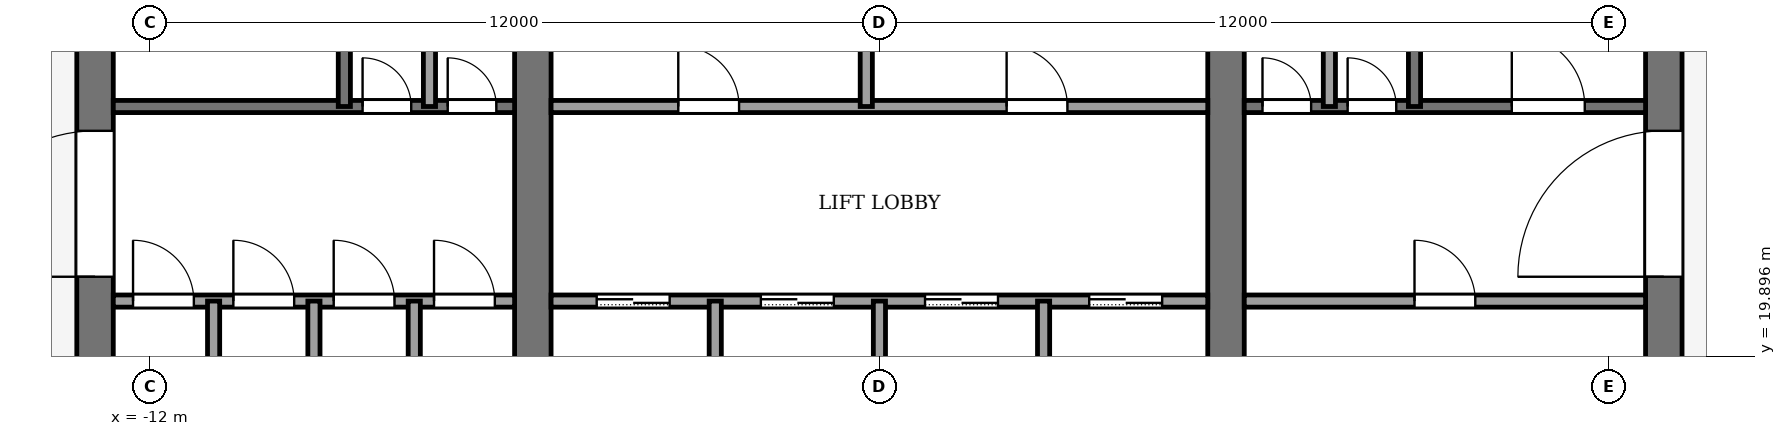
"""IFC4 building model, lengths in metres.
Left out: names, types, materials, properties, quantities, classifications, styles, units other than length and angle.
Written with IfcOpenShell. Run it as: python <this file> out.ifc"""

import sys

from ifc_helpers import new_model, si_unit, direction, frame, frame_2d, origin, place, context, subcontext, project, spatial, rectangle, extrude, element, fill, save


model = new_model("IFC4")
c1 = context("Model", 3, precision=1e-05, world=origin(), true_north=direction((0.0, 1.0)))
c2 = subcontext(c1, "Body", "Model", "MODEL_VIEW")
j1 = project(units=[si_unit("LENGTHUNIT", "METRE"), si_unit("PLANEANGLEUNIT", "RADIAN")], contexts=[c1])
p1 = place(None, origin())
s1 = spatial("IfcSite", under=j1, at=p1, CompositionType="ELEMENT")
p2 = place(p1, origin())
s2 = spatial("IfcBuilding", under=s1, at=p2, CompositionType="ELEMENT")
p3 = place(p2, frame((0.0, 0.0, 302.0)))
s3 = spatial("IfcBuildingStorey", under=s2, at=p3, CompositionType="ELEMENT", Elevation=302.0)
p4 = place(p3, frame((-12.9, 18.4, -0.13), z_axis=(0.0, 0.0, 1.0), x_axis=(0.0, 1.0, 0.0)))
e1 = element("IfcWall", 1, at=p4, inside=s3, PredefinedType="SHEAR", context=c2, shape_type="SweptSolid", body=[
    extrude(rectangle(XDim=19.2, YDim=0.6, at=frame_2d((9.6, 0.0))), origin(), (0.0, 0.0, 1.0), 4.0),
])
p5 = place(p4, frame((2.8, 0.0, 0.13)))
e2 = element("IfcOpeningElement", 2, at=p5, cuts=e1, PredefinedType="OPENING", context=c2, shape_type="SweptSolid", body=[
    extrude(rectangle(XDim=2.4, YDim=2.4, at=frame_2d((1.2, 1.2))), frame((0.0, 0.31, 0.0), z_axis=(0.0, -1.0, 0.0), x_axis=(1.0, 0.0, 0.0)), (0.0, 0.0, 1.0), 0.62),
])
p6 = place(p4, frame((13.4, 0.0, 0.13)))
e3 = element("IfcOpeningElement", 3, at=p6, cuts=e1, PredefinedType="OPENING", context=c2, shape_type="SweptSolid", body=[
    extrude(rectangle(XDim=1.4, YDim=2.2, at=frame_2d((0.7, 1.1))), frame((0.0, 0.31, 0.0), z_axis=(0.0, -1.0, 0.0), x_axis=(1.0, 0.0, 0.0)), (0.0, 0.0, 1.0), 0.62),
])
p7 = place(p3, frame((12.9, 18.4, -0.13), z_axis=(0.0, 0.0, 1.0), x_axis=(0.0, 1.0, 0.0)))
e4 = element("IfcWall", 4, at=p7, inside=s3, PredefinedType="SHEAR", context=c2, shape_type="SweptSolid", body=[
    extrude(rectangle(XDim=19.2, YDim=0.6, at=frame_2d((9.6, 0.0))), origin(), (0.0, 0.0, 1.0), 4.0),
])
p8 = place(p7, frame((2.8, 0.0, 0.13)))
e5 = element("IfcOpeningElement", 5, at=p8, cuts=e4, PredefinedType="OPENING", context=c2, shape_type="SweptSolid", body=[
    extrude(rectangle(XDim=2.4, YDim=2.4, at=frame_2d((1.2, 1.2))), frame((0.0, 0.31, 0.0), z_axis=(0.0, -1.0, 0.0), x_axis=(1.0, 0.0, 0.0)), (0.0, 0.0, 1.0), 0.62),
])
p9 = place(p7, frame((13.3, 0.0, 0.13)))
e6 = element("IfcOpeningElement", 6, at=p9, cuts=e4, PredefinedType="OPENING", context=c2, shape_type="SweptSolid", body=[
    extrude(rectangle(XDim=2.4, YDim=2.4, at=frame_2d((1.2, 1.2))), frame((0.0, 0.31, 0.0), z_axis=(0.0, -1.0, 0.0), x_axis=(1.0, 0.0, 0.0)), (0.0, 0.0, 1.0), 0.62),
])
p10 = place(p3, frame((-5.7, 18.4, -0.13), z_axis=(0.0, 0.0, 1.0), x_axis=(0.0, 1.0, 0.0)))
e7 = element("IfcWall", 7, at=p10, inside=s3, PredefinedType="SHEAR", context=c2, shape_type="SweptSolid", body=[
    extrude(rectangle(XDim=19.2, YDim=0.6, at=frame_2d((9.6, 0.0))), origin(), (0.0, 0.0, 1.0), 4.0),
])
p11 = place(p10, frame((8.35, 0.0, 0.13)))
e8 = element("IfcOpeningElement", 8, at=p11, cuts=e7, PredefinedType="OPENING", context=c2, shape_type="SweptSolid", body=[
    extrude(rectangle(XDim=0.9, YDim=2.1, at=frame_2d((0.45, 1.05))), frame((0.0, 0.31, 0.0), z_axis=(0.0, -1.0, 0.0), x_axis=(1.0, 0.0, 0.0)), (0.0, 0.0, 1.0), 0.62),
])
p12 = place(p3, frame((5.7, 18.4, -0.13), z_axis=(0.0, 0.0, 1.0), x_axis=(0.0, 1.0, 0.0)))
e9 = element("IfcWall", 9, at=p12, inside=s3, PredefinedType="SHEAR", context=c2, shape_type="SweptSolid", body=[
    extrude(rectangle(XDim=19.2, YDim=0.6, at=frame_2d((9.6, 0.0))), origin(), (0.0, 0.0, 1.0), 4.0),
])
p13 = place(p12, frame((8.35, 0.0, 0.13)))
e10 = element("IfcOpeningElement", 10, at=p13, cuts=e9, PredefinedType="OPENING", context=c2, shape_type="SweptSolid", body=[
    extrude(rectangle(XDim=0.9, YDim=2.1, at=frame_2d((0.45, 1.05))), frame((0.0, 0.31, 0.0), z_axis=(0.0, -1.0, 0.0), x_axis=(1.0, 0.0, 0.0)), (0.0, 0.0, 1.0), 0.62),
])
p14 = place(p12, frame((13.3, 0.0, 0.13)))
e11 = element("IfcOpeningElement", 11, at=p14, cuts=e9, PredefinedType="OPENING", context=c2, shape_type="SweptSolid", body=[
    extrude(rectangle(XDim=2.4, YDim=2.4, at=frame_2d((1.2, 1.2))), frame((0.0, 0.31, 0.0), z_axis=(0.0, -1.0, 0.0), x_axis=(1.0, 0.0, 0.0)), (0.0, 0.0, 1.0), 0.62),
])
p15 = place(p3, frame((-12.6, 20.8, 0.0), z_axis=(0.0, 0.0, 1.0), x_axis=(1.0, 0.0, 0.0)))
e12 = element("IfcWall", 12, at=p15, inside=s3, PredefinedType="PARTITIONING", context=c2, shape_type="SweptSolid", body=[
    extrude(rectangle(XDim=6.6, YDim=0.2, at=frame_2d((3.3, 0.0))), origin(), (0.0, 0.0, 1.0), 3.87),
])
p16 = place(p15, frame((0.325, 0.0, 0.0)))
e13 = element("IfcOpeningElement", 13, at=p16, cuts=e12, PredefinedType="OPENING", context=c2, shape_type="SweptSolid", body=[
    extrude(rectangle(XDim=1.0, YDim=2.1, at=frame_2d((0.5, 1.05))), frame((0.0, 0.11, 0.0), z_axis=(0.0, -1.0, 0.0), x_axis=(1.0, 0.0, 0.0)), (0.0, 0.0, 1.0), 0.22),
])
p17 = place(p15, frame((1.975, 0.0, 0.0)))
e14 = element("IfcOpeningElement", 14, at=p17, cuts=e12, PredefinedType="OPENING", context=c2, shape_type="SweptSolid", body=[
    extrude(rectangle(XDim=1.0, YDim=2.1, at=frame_2d((0.5, 1.05))), frame((0.0, 0.11, 0.0), z_axis=(0.0, -1.0, 0.0), x_axis=(1.0, 0.0, 0.0)), (0.0, 0.0, 1.0), 0.22),
])
p18 = place(p15, frame((3.625, 0.0, 0.0)))
e15 = element("IfcOpeningElement", 15, at=p18, cuts=e12, PredefinedType="OPENING", context=c2, shape_type="SweptSolid", body=[
    extrude(rectangle(XDim=1.0, YDim=2.1, at=frame_2d((0.5, 1.05))), frame((0.0, 0.11, 0.0), z_axis=(0.0, -1.0, 0.0), x_axis=(1.0, 0.0, 0.0)), (0.0, 0.0, 1.0), 0.22),
])
p19 = place(p15, frame((5.275, 0.0, 0.0)))
e16 = element("IfcOpeningElement", 16, at=p19, cuts=e12, PredefinedType="OPENING", context=c2, shape_type="SweptSolid", body=[
    extrude(rectangle(XDim=1.0, YDim=2.1, at=frame_2d((0.5, 1.05))), frame((0.0, 0.11, 0.0), z_axis=(0.0, -1.0, 0.0), x_axis=(1.0, 0.0, 0.0)), (0.0, 0.0, 1.0), 0.22),
])
p20 = place(p3, frame((-5.4, 20.8, 0.0), z_axis=(0.0, 0.0, 1.0), x_axis=(1.0, 0.0, 0.0)))
e17 = element("IfcWall", 17, at=p20, inside=s3, PredefinedType="PARTITIONING", context=c2, shape_type="SweptSolid", body=[
    extrude(rectangle(XDim=10.8, YDim=0.2, at=frame_2d((5.4, 0.0))), origin(), (0.0, 0.0, 1.0), 3.87),
])
p21 = place(p20, frame((0.75, 0.0, 0.0)))
e18 = element("IfcOpeningElement", 18, at=p21, cuts=e17, PredefinedType="OPENING", context=c2, shape_type="SweptSolid", body=[
    extrude(rectangle(XDim=1.2, YDim=2.2, at=frame_2d((0.6, 1.1))), frame((0.0, 0.11, 0.0), z_axis=(0.0, -1.0, 0.0), x_axis=(1.0, 0.0, 0.0)), (0.0, 0.0, 1.0), 0.22),
])
p22 = place(p20, frame((3.45, 0.0, 0.0)))
e19 = element("IfcOpeningElement", 19, at=p22, cuts=e17, PredefinedType="OPENING", context=c2, shape_type="SweptSolid", body=[
    extrude(rectangle(XDim=1.2, YDim=2.2, at=frame_2d((0.6, 1.1))), frame((0.0, 0.11, 0.0), z_axis=(0.0, -1.0, 0.0), x_axis=(1.0, 0.0, 0.0)), (0.0, 0.0, 1.0), 0.22),
])
p23 = place(p20, frame((6.15, 0.0, 0.0)))
e20 = element("IfcOpeningElement", 20, at=p23, cuts=e17, PredefinedType="OPENING", context=c2, shape_type="SweptSolid", body=[
    extrude(rectangle(XDim=1.2, YDim=2.2, at=frame_2d((0.6, 1.1))), frame((0.0, 0.11, 0.0), z_axis=(0.0, -1.0, 0.0), x_axis=(1.0, 0.0, 0.0)), (0.0, 0.0, 1.0), 0.22),
])
p24 = place(p20, frame((8.85, 0.0, 0.0)))
e21 = element("IfcOpeningElement", 21, at=p24, cuts=e17, PredefinedType="OPENING", context=c2, shape_type="SweptSolid", body=[
    extrude(rectangle(XDim=1.2, YDim=2.2, at=frame_2d((0.6, 1.1))), frame((0.0, 0.11, 0.0), z_axis=(0.0, -1.0, 0.0), x_axis=(1.0, 0.0, 0.0)), (0.0, 0.0, 1.0), 0.22),
])
p25 = place(p3, frame((6.0, 20.8, 0.0), z_axis=(0.0, 0.0, 1.0), x_axis=(1.0, 0.0, 0.0)))
e22 = element("IfcWall", 22, at=p25, inside=s3, PredefinedType="PARTITIONING", context=c2, shape_type="SweptSolid", body=[
    extrude(rectangle(XDim=6.6, YDim=0.2, at=frame_2d((3.3, 0.0))), origin(), (0.0, 0.0, 1.0), 3.87),
])
p26 = place(p25, frame((2.8, 0.0, 0.0)))
e23 = element("IfcOpeningElement", 23, at=p26, cuts=e22, PredefinedType="OPENING", context=c2, shape_type="SweptSolid", body=[
    extrude(rectangle(XDim=1.0, YDim=2.1, at=frame_2d((0.5, 1.05))), frame((0.0, 0.11, 0.0), z_axis=(0.0, -1.0, 0.0), x_axis=(1.0, 0.0, 0.0)), (0.0, 0.0, 1.0), 0.22),
])
p27 = place(p3, frame((-12.6, 24.0, 0.0), z_axis=(0.0, 0.0, 1.0), x_axis=(1.0, 0.0, 0.0)))
e24 = element("IfcWall", 24, at=p27, inside=s3, PredefinedType="PARTITIONING", context=c2, shape_type="SweptSolid", body=[
    extrude(rectangle(XDim=6.6, YDim=0.2, at=frame_2d((3.3, 0.0))), origin(), (0.0, 0.0, 1.0), 3.87),
])
p28 = place(p27, frame((4.1, 0.0, 0.0)))
e25 = element("IfcOpeningElement", 25, at=p28, cuts=e24, PredefinedType="OPENING", context=c2, shape_type="SweptSolid", body=[
    extrude(rectangle(XDim=0.8, YDim=2.1, at=frame_2d((0.4, 1.05))), frame((0.0, 0.11, 0.0), z_axis=(0.0, -1.0, 0.0), x_axis=(1.0, 0.0, 0.0)), (0.0, 0.0, 1.0), 0.22),
])
p29 = place(p27, frame((5.5, 0.0, 0.0)))
e26 = element("IfcOpeningElement", 26, at=p29, cuts=e24, PredefinedType="OPENING", context=c2, shape_type="SweptSolid", body=[
    extrude(rectangle(XDim=0.8, YDim=2.1, at=frame_2d((0.4, 1.05))), frame((0.0, 0.11, 0.0), z_axis=(0.0, -1.0, 0.0), x_axis=(1.0, 0.0, 0.0)), (0.0, 0.0, 1.0), 0.22),
])
p30 = place(p3, frame((-5.4, 24.0, 0.0), z_axis=(0.0, 0.0, 1.0), x_axis=(1.0, 0.0, 0.0)))
e27 = element("IfcWall", 27, at=p30, inside=s3, PredefinedType="PARTITIONING", context=c2, shape_type="SweptSolid", body=[
    extrude(rectangle(XDim=10.8, YDim=0.2, at=frame_2d((5.4, 0.0))), origin(), (0.0, 0.0, 1.0), 3.87),
])
p31 = place(p30, frame((2.092, 0.0, 0.0)))
e28 = element("IfcOpeningElement", 28, at=p31, cuts=e27, PredefinedType="OPENING", context=c2, shape_type="SweptSolid", body=[
    extrude(rectangle(XDim=1.0, YDim=2.1, at=frame_2d((0.5, 1.05))), frame((0.0, 0.11, 0.0), z_axis=(0.0, -1.0, 0.0), x_axis=(1.0, 0.0, 0.0)), (0.0, 0.0, 1.0), 0.22),
])
p32 = place(p30, frame((7.492, 0.0, 0.0)))
e29 = element("IfcOpeningElement", 29, at=p32, cuts=e27, PredefinedType="OPENING", context=c2, shape_type="SweptSolid", body=[
    extrude(rectangle(XDim=1.0, YDim=2.1, at=frame_2d((0.5, 1.05))), frame((0.0, 0.11, 0.0), z_axis=(0.0, -1.0, 0.0), x_axis=(1.0, 0.0, 0.0)), (0.0, 0.0, 1.0), 0.22),
])
p33 = place(p3, frame((6.0, 24.0, 0.0), z_axis=(0.0, 0.0, 1.0), x_axis=(1.0, 0.0, 0.0)))
e30 = element("IfcWall", 30, at=p33, inside=s3, PredefinedType="PARTITIONING", context=c2, shape_type="SweptSolid", body=[
    extrude(rectangle(XDim=6.6, YDim=0.2, at=frame_2d((3.3, 0.0))), origin(), (0.0, 0.0, 1.0), 3.87),
])
p34 = place(p33, frame((0.3, 0.0, 0.0)))
e31 = element("IfcOpeningElement", 31, at=p34, cuts=e30, PredefinedType="OPENING", context=c2, shape_type="SweptSolid", body=[
    extrude(rectangle(XDim=0.8, YDim=2.1, at=frame_2d((0.4, 1.05))), frame((0.0, 0.11, 0.0), z_axis=(0.0, -1.0, 0.0), x_axis=(1.0, 0.0, 0.0)), (0.0, 0.0, 1.0), 0.22),
])
p35 = place(p33, frame((1.7, 0.0, 0.0)))
e32 = element("IfcOpeningElement", 32, at=p35, cuts=e30, PredefinedType="OPENING", context=c2, shape_type="SweptSolid", body=[
    extrude(rectangle(XDim=0.8, YDim=2.1, at=frame_2d((0.4, 1.05))), frame((0.0, 0.11, 0.0), z_axis=(0.0, -1.0, 0.0), x_axis=(1.0, 0.0, 0.0)), (0.0, 0.0, 1.0), 0.22),
])
p36 = place(p33, frame((4.4, 0.0, 0.0)))
e33 = element("IfcOpeningElement", 33, at=p36, cuts=e30, PredefinedType="OPENING", context=c2, shape_type="SweptSolid", body=[
    extrude(rectangle(XDim=1.2, YDim=2.2, at=frame_2d((0.6, 1.1))), frame((0.0, 0.11, 0.0), z_axis=(0.0, -1.0, 0.0), x_axis=(1.0, 0.0, 0.0)), (0.0, 0.0, 1.0), 0.22),
])
for number, where, z_axis, x_axis in (
    (34, (-10.95, 18.4, 0.0), (0.0, 0.0, 1.0), (0.0, 1.0, 0.0)),
    (35, (-9.3, 18.4, 0.0), (0.0, 0.0, 1.0), (0.0, 1.0, 0.0)),
):
    element("IfcWall", number, at=place(p3, frame(where, z_axis=z_axis, x_axis=x_axis)), inside=s3, PredefinedType="PARTITIONING", context=c2, shape_type="SweptSolid", body=[
        extrude(rectangle(XDim=2.4, YDim=0.2, at=frame_2d((1.2, 0.0))), origin(), (0.0, 0.0, 1.0), 3.87),
    ])
p37 = place(p3, frame((-8.8, 24.0, 0.0), z_axis=(0.0, 0.0, 1.0), x_axis=(0.0, 1.0, 0.0)))
e36 = element("IfcWall", 36, at=p37, inside=s3, PredefinedType="PARTITIONING", context=c2, shape_type="SweptSolid", body=[
    extrude(rectangle(XDim=7.4, YDim=0.2, at=frame_2d((3.7, 0.0))), origin(), (0.0, 0.0, 1.0), 3.87),
])
p38 = place(p3, frame((-7.65, 18.4, 0.0), z_axis=(0.0, 0.0, 1.0), x_axis=(0.0, 1.0, 0.0)))
e37 = element("IfcWall", 37, at=p38, inside=s3, PredefinedType="PARTITIONING", context=c2, shape_type="SweptSolid", body=[
    extrude(rectangle(XDim=2.4, YDim=0.2, at=frame_2d((1.2, 0.0))), origin(), (0.0, 0.0, 1.0), 3.87),
])
p39 = place(p3, frame((-7.4, 24.0, 0.0), z_axis=(0.0, 0.0, 1.0), x_axis=(0.0, 1.0, 0.0)))
e38 = element("IfcWall", 38, at=p39, inside=s3, PredefinedType="PARTITIONING", context=c2, shape_type="SweptSolid", body=[
    extrude(rectangle(XDim=7.4, YDim=0.2, at=frame_2d((3.7, 0.0))), origin(), (0.0, 0.0, 1.0), 3.87),
])
p40 = place(p3, frame((-2.7, 18.4, 0.0), z_axis=(0.0, 0.0, 1.0), x_axis=(0.0, 1.0, 0.0)))
e39 = element("IfcWall", 39, at=p40, inside=s3, PredefinedType="PARTITIONING", context=c2, shape_type="SweptSolid", body=[
    extrude(rectangle(XDim=2.4, YDim=0.2, at=frame_2d((1.2, 0.0))), origin(), (0.0, 0.0, 1.0), 3.87),
])
p41 = place(p3, frame((-0.216, 24.0, 0.0), z_axis=(0.0, 0.0, 1.0), x_axis=(0.0, 1.0, 0.0)))
e40 = element("IfcWall", 40, at=p41, inside=s3, PredefinedType="PARTITIONING", context=c2, shape_type="SweptSolid", body=[
    extrude(rectangle(XDim=2.4, YDim=0.2, at=frame_2d((1.2, 0.0))), origin(), (0.0, 0.0, 1.0), 3.87),
])
for number, where, z_axis, x_axis in (
    (41, (0.0, 18.4, 0.0), (0.0, 0.0, 1.0), (0.0, 1.0, 0.0)),
    (42, (2.7, 18.4, 0.0), (0.0, 0.0, 1.0), (0.0, 1.0, 0.0)),
):
    element("IfcWall", number, at=place(p3, frame(where, z_axis=z_axis, x_axis=x_axis)), inside=s3, PredefinedType="PARTITIONING", context=c2, shape_type="SweptSolid", body=[
        extrude(rectangle(XDim=2.4, YDim=0.2, at=frame_2d((1.2, 0.0))), origin(), (0.0, 0.0, 1.0), 3.87),
    ])
for number, where, z_axis, x_axis in (
    (43, (7.4, 24.0, 0.0), (0.0, 0.0, 1.0), (0.0, 1.0, 0.0)),
    (44, (8.8, 24.0, 0.0), (0.0, 0.0, 1.0), (0.0, 1.0, 0.0)),
):
    element("IfcWall", number, at=place(p3, frame(where, z_axis=z_axis, x_axis=x_axis)), inside=s3, PredefinedType="PARTITIONING", context=c2, shape_type="SweptSolid", body=[
        extrude(rectangle(XDim=7.4, YDim=0.2, at=frame_2d((3.7, 0.0))), origin(), (0.0, 0.0, 1.0), 3.87),
    ])
p42 = place(p21, origin())
e45 = element("IfcDoor", 45, at=p42, inside=s3, OperationType="SLIDING_TO_LEFT", PredefinedType="DOOR", context=c2, shape_type="SweptSolid", body=[
    extrude(rectangle(XDim=1.2, YDim=2.2, at=frame_2d((0.6, 1.1))), frame((0.0, 0.025, 0.0), z_axis=(0.0, -1.0, 0.0), x_axis=(1.0, 0.0, 0.0)), (0.0, 0.0, 1.0), 0.05),
])
fill(e18, e45)
p43 = place(p22, origin())
e46 = element("IfcDoor", 46, at=p43, inside=s3, OperationType="SLIDING_TO_LEFT", PredefinedType="DOOR", context=c2, shape_type="SweptSolid", body=[
    extrude(rectangle(XDim=1.2, YDim=2.2, at=frame_2d((0.6, 1.1))), frame((0.0, 0.025, 0.0), z_axis=(0.0, -1.0, 0.0), x_axis=(1.0, 0.0, 0.0)), (0.0, 0.0, 1.0), 0.05),
])
fill(e19, e46)
p44 = place(p23, origin())
e47 = element("IfcDoor", 47, at=p44, inside=s3, OperationType="SLIDING_TO_LEFT", PredefinedType="DOOR", context=c2, shape_type="SweptSolid", body=[
    extrude(rectangle(XDim=1.2, YDim=2.2, at=frame_2d((0.6, 1.1))), frame((0.0, 0.025, 0.0), z_axis=(0.0, -1.0, 0.0), x_axis=(1.0, 0.0, 0.0)), (0.0, 0.0, 1.0), 0.05),
])
fill(e20, e47)
p45 = place(p24, origin())
e48 = element("IfcDoor", 48, at=p45, inside=s3, OperationType="SLIDING_TO_LEFT", PredefinedType="DOOR", context=c2, shape_type="SweptSolid", body=[
    extrude(rectangle(XDim=1.2, YDim=2.2, at=frame_2d((0.6, 1.1))), frame((0.0, 0.025, 0.0), z_axis=(0.0, -1.0, 0.0), x_axis=(1.0, 0.0, 0.0)), (0.0, 0.0, 1.0), 0.05),
])
fill(e21, e48)
p46 = place(p31, origin())
e49 = element("IfcDoor", 49, at=p46, inside=s3, OperationType="SINGLE_SWING_RIGHT", PredefinedType="DOOR", context=c2, shape_type="SweptSolid", body=[
    extrude(rectangle(XDim=1.0, YDim=2.1, at=frame_2d((0.5, 1.05))), frame((0.0, 0.025, 0.0), z_axis=(0.0, -1.0, 0.0), x_axis=(1.0, 0.0, 0.0)), (0.0, 0.0, 1.0), 0.05),
])
fill(e28, e49)
p47 = place(p32, origin())
e50 = element("IfcDoor", 50, at=p47, inside=s3, OperationType="SINGLE_SWING_LEFT", PredefinedType="DOOR", context=c2, shape_type="SweptSolid", body=[
    extrude(rectangle(XDim=1.0, YDim=2.1, at=frame_2d((0.5, 1.05))), frame((0.0, 0.025, 0.0), z_axis=(0.0, -1.0, 0.0), x_axis=(1.0, 0.0, 0.0)), (0.0, 0.0, 1.0), 0.05),
])
fill(e29, e50)
p48 = place(p16, origin())
e51 = element("IfcDoor", 51, at=p48, inside=s3, OperationType="SINGLE_SWING_RIGHT", PredefinedType="DOOR", context=c2, shape_type="SweptSolid", body=[
    extrude(rectangle(XDim=1.0, YDim=2.1, at=frame_2d((0.5, 1.05))), frame((0.0, 0.025, 0.0), z_axis=(0.0, -1.0, 0.0), x_axis=(1.0, 0.0, 0.0)), (0.0, 0.0, 1.0), 0.05),
])
fill(e13, e51)
p49 = place(p17, origin())
e52 = element("IfcDoor", 52, at=p49, inside=s3, OperationType="SINGLE_SWING_RIGHT", PredefinedType="DOOR", context=c2, shape_type="SweptSolid", body=[
    extrude(rectangle(XDim=1.0, YDim=2.1, at=frame_2d((0.5, 1.05))), frame((0.0, 0.025, 0.0), z_axis=(0.0, -1.0, 0.0), x_axis=(1.0, 0.0, 0.0)), (0.0, 0.0, 1.0), 0.05),
])
fill(e14, e52)
p50 = place(p18, origin())
e53 = element("IfcDoor", 53, at=p50, inside=s3, OperationType="SINGLE_SWING_LEFT", PredefinedType="DOOR", context=c2, shape_type="SweptSolid", body=[
    extrude(rectangle(XDim=1.0, YDim=2.1, at=frame_2d((0.5, 1.05))), frame((0.0, 0.025, 0.0), z_axis=(0.0, -1.0, 0.0), x_axis=(1.0, 0.0, 0.0)), (0.0, 0.0, 1.0), 0.05),
])
fill(e15, e53)
p51 = place(p19, origin())
e54 = element("IfcDoor", 54, at=p51, inside=s3, OperationType="SINGLE_SWING_LEFT", PredefinedType="DOOR", context=c2, shape_type="SweptSolid", body=[
    extrude(rectangle(XDim=1.0, YDim=2.1, at=frame_2d((0.5, 1.05))), frame((0.0, 0.025, 0.0), z_axis=(0.0, -1.0, 0.0), x_axis=(1.0, 0.0, 0.0)), (0.0, 0.0, 1.0), 0.05),
])
fill(e16, e54)
p52 = place(p26, origin())
e55 = element("IfcDoor", 55, at=p52, inside=s3, OperationType="SINGLE_SWING_LEFT", PredefinedType="DOOR", context=c2, shape_type="SweptSolid", body=[
    extrude(rectangle(XDim=1.0, YDim=2.1, at=frame_2d((0.5, 1.05))), frame((0.0, 0.025, 0.0), z_axis=(0.0, -1.0, 0.0), x_axis=(1.0, 0.0, 0.0)), (0.0, 0.0, 1.0), 0.05),
])
fill(e23, e55)
p53 = place(p28, origin())
e56 = element("IfcDoor", 56, at=p53, inside=s3, OperationType="SINGLE_SWING_RIGHT", PredefinedType="DOOR", context=c2, shape_type="SweptSolid", body=[
    extrude(rectangle(XDim=0.8, YDim=2.1, at=frame_2d((0.4, 1.05))), frame((0.0, 0.025, 0.0), z_axis=(0.0, -1.0, 0.0), x_axis=(1.0, 0.0, 0.0)), (0.0, 0.0, 1.0), 0.05),
])
fill(e25, e56)
p54 = place(p29, origin())
e57 = element("IfcDoor", 57, at=p54, inside=s3, OperationType="SINGLE_SWING_LEFT", PredefinedType="DOOR", context=c2, shape_type="SweptSolid", body=[
    extrude(rectangle(XDim=0.8, YDim=2.1, at=frame_2d((0.4, 1.05))), frame((0.0, 0.025, 0.0), z_axis=(0.0, -1.0, 0.0), x_axis=(1.0, 0.0, 0.0)), (0.0, 0.0, 1.0), 0.05),
])
fill(e26, e57)
p55 = place(p34, origin())
e58 = element("IfcDoor", 58, at=p55, inside=s3, OperationType="SINGLE_SWING_RIGHT", PredefinedType="DOOR", context=c2, shape_type="SweptSolid", body=[
    extrude(rectangle(XDim=0.8, YDim=2.1, at=frame_2d((0.4, 1.05))), frame((0.0, 0.025, 0.0), z_axis=(0.0, -1.0, 0.0), x_axis=(1.0, 0.0, 0.0)), (0.0, 0.0, 1.0), 0.05),
])
fill(e31, e58)
p56 = place(p35, origin())
e59 = element("IfcDoor", 59, at=p56, inside=s3, OperationType="SINGLE_SWING_LEFT", PredefinedType="DOOR", context=c2, shape_type="SweptSolid", body=[
    extrude(rectangle(XDim=0.8, YDim=2.1, at=frame_2d((0.4, 1.05))), frame((0.0, 0.025, 0.0), z_axis=(0.0, -1.0, 0.0), x_axis=(1.0, 0.0, 0.0)), (0.0, 0.0, 1.0), 0.05),
])
fill(e32, e59)
p57 = place(p36, origin())
e60 = element("IfcDoor", 60, at=p57, inside=s3, OperationType="SINGLE_SWING_LEFT", PredefinedType="DOOR", context=c2, shape_type="SweptSolid", body=[
    extrude(rectangle(XDim=1.2, YDim=2.2, at=frame_2d((0.6, 1.1))), frame((0.0, 0.025, 0.0), z_axis=(0.0, -1.0, 0.0), x_axis=(1.0, 0.0, 0.0)), (0.0, 0.0, 1.0), 0.05),
])
fill(e33, e60)
p58 = place(p5, origin())
e61 = element("IfcDoor", 61, at=p58, inside=s3, OperationType="DOUBLE_DOOR_SINGLE_SWING", PredefinedType="DOOR", context=c2, shape_type="SweptSolid", body=[
    extrude(rectangle(XDim=2.4, YDim=2.4, at=frame_2d((1.2, 1.2))), frame((0.0, 0.025, 0.0), z_axis=(0.0, -1.0, 0.0), x_axis=(1.0, 0.0, 0.0)), (0.0, 0.0, 1.0), 0.05),
])
fill(e2, e61)
p59 = place(p8, origin())
e62 = element("IfcDoor", 62, at=p59, inside=s3, OperationType="DOUBLE_DOOR_SINGLE_SWING", PredefinedType="DOOR", context=c2, shape_type="SweptSolid", body=[
    extrude(rectangle(XDim=2.4, YDim=2.4, at=frame_2d((1.2, 1.2))), frame((0.0, 0.025, 0.0), z_axis=(0.0, -1.0, 0.0), x_axis=(1.0, 0.0, 0.0)), (0.0, 0.0, 1.0), 0.05),
])
fill(e5, e62)
save(model, sys.argv[1])
